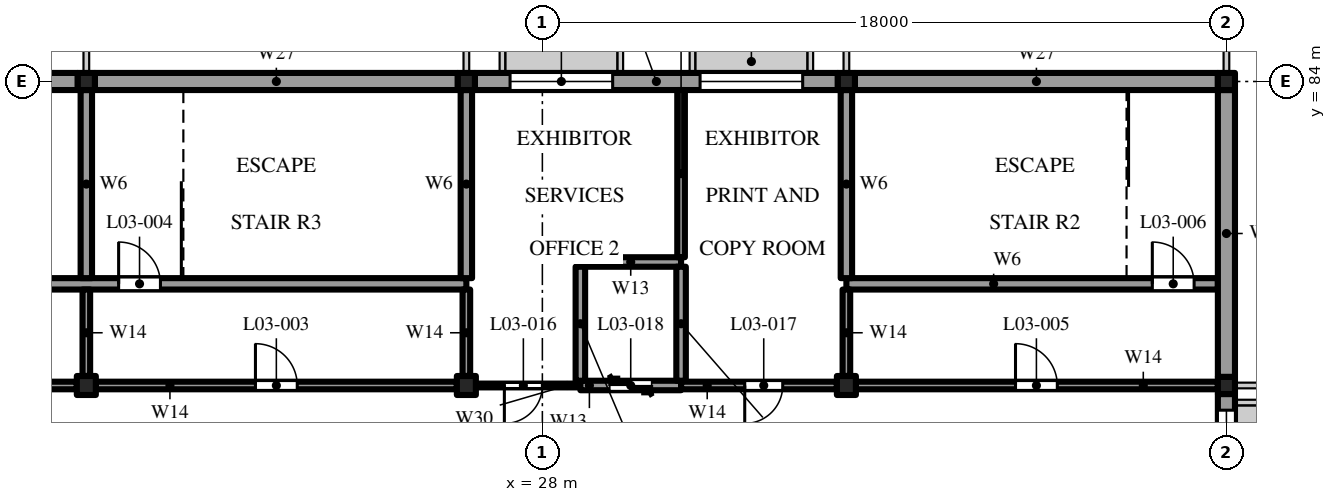
"""IFC4 building model, lengths in metres.
Left out: names, types, materials, properties, quantities, classifications, styles, units other than length and angle.
Written with IfcOpenShell. Run it as: python <this file> out.ifc"""

import sys

from ifc_helpers import new_model, si_unit, direction, frame, frame_2d, origin, origin_2d, place, context, subcontext, project, spatial, polyline, rectangle, outline, extrude, element, fill, save


model = new_model("IFC4")
c1 = context("Model", 3, precision=1e-05, world=origin(), true_north=direction((0.0, 1.0)))
c2 = subcontext(c1, "Body", "Model", "MODEL_VIEW")
j1 = project(units=[si_unit("LENGTHUNIT", "METRE"), si_unit("PLANEANGLEUNIT", "RADIAN")], contexts=[c1])
p1 = place(None, origin())
s1 = spatial("IfcSite", under=j1, at=p1, CompositionType="ELEMENT")
p2 = place(p1, origin())
s2 = spatial("IfcBuilding", under=s1, at=p2, CompositionType="ELEMENT")
p3 = place(p2, frame((0.0, 0.0, 16.8)))
s3 = spatial("IfcBuildingStorey", under=s2, at=p3, CompositionType="ELEMENT", Elevation=16.8)
p4 = place(p3, frame((16.0, 76.0, 0.0), z_axis=(0.0, 0.0, 1.0), x_axis=(1.0, 0.0, 0.0)))
e1 = element("IfcColumn", 1, at=p4, inside=s3, PredefinedType="COLUMN", context=c2, shape_type="SweptSolid", body=[
    extrude(rectangle(XDim=0.5, YDim=0.5, at=origin_2d()), origin(), (0.0, 0.0, 1.0), 4.8),
])
p5 = place(p3, frame((16.0, 84.0, 0.0), z_axis=(0.0, 0.0, 1.0), x_axis=(1.0, 0.0, 0.0)))
e2 = element("IfcColumn", 2, at=p5, inside=s3, PredefinedType="COLUMN", context=c2, shape_type="SweptSolid", body=[
    extrude(rectangle(XDim=0.45, YDim=0.45, at=origin_2d()), origin(), (0.0, 0.0, 1.0), 4.8),
])
p6 = place(p3, frame((26.0, 76.0, 0.0), z_axis=(0.0, 0.0, 1.0), x_axis=(1.0, 0.0, 0.0)))
e3 = element("IfcColumn", 3, at=p6, inside=s3, PredefinedType="COLUMN", context=c2, shape_type="SweptSolid", body=[
    extrude(rectangle(XDim=0.5, YDim=0.5, at=origin_2d()), origin(), (0.0, 0.0, 1.0), 4.8),
])
p7 = place(p3, frame((26.0, 84.0, 0.0), z_axis=(0.0, 0.0, 1.0), x_axis=(1.0, 0.0, 0.0)))
e4 = element("IfcColumn", 4, at=p7, inside=s3, PredefinedType="COLUMN", context=c2, shape_type="SweptSolid", body=[
    extrude(rectangle(XDim=0.45, YDim=0.45, at=origin_2d()), origin(), (0.0, 0.0, 1.0), 4.8),
])
p8 = place(p3, frame((36.0, 76.0, 0.0), z_axis=(0.0, 0.0, 1.0), x_axis=(1.0, 0.0, 0.0)))
e5 = element("IfcColumn", 5, at=p8, inside=s3, PredefinedType="COLUMN", context=c2, shape_type="SweptSolid", body=[
    extrude(rectangle(XDim=0.5, YDim=0.5, at=origin_2d()), origin(), (0.0, 0.0, 1.0), 4.8),
])
for number, where, z_axis, x_axis in (
    (6, (36.0, 84.0, 0.0), (0.0, 0.0, 1.0), (1.0, 0.0, 0.0)),
    (7, (46.0, 76.0, 0.0), (0.0, 0.0, 1.0), (1.0, 0.0, 0.0)),
    (8, (46.0, 84.0, 0.0), (0.0, 0.0, 1.0), (1.0, 0.0, 0.0)),
):
    element("IfcColumn", number, at=place(p3, frame(where, z_axis=z_axis, x_axis=x_axis)), inside=s3, PredefinedType="COLUMN", context=c2, shape_type="SweptSolid", body=[
        extrude(rectangle(XDim=0.45, YDim=0.45, at=origin_2d()), origin(), (0.0, 0.0, 1.0), 4.8),
    ])
p9 = place(p3, frame((6.225, 76.0, 0.0), z_axis=(0.0, 0.0, 1.0), x_axis=(1.0, 0.0, 0.0)))
e9 = element("IfcWall", 9, at=p9, inside=s3, PredefinedType="SOLIDWALL", context=c2, shape_type="SweptSolid", body=[
    extrude(rectangle(XDim=9.525, YDim=0.2, at=frame_2d((4.762, 0.0))), origin(), (0.0, 0.0, 1.0), 10.343),
])
p10 = place(p9, frame((7.325, 0.0, 0.0)))
e10 = element("IfcOpeningElement", 10, at=p10, cuts=e9, PredefinedType="OPENING", context=c2, shape_type="SweptSolid", body=[
    extrude(rectangle(XDim=1.1, YDim=2.1, at=frame_2d((0.55, 1.05))), frame((0.0, 0.11, 0.0), z_axis=(0.0, -1.0, 0.0), x_axis=(1.0, 0.0, 0.0)), (0.0, 0.0, 1.0), 0.22),
])
p11 = place(p3, frame((16.25, 76.0, 0.0), z_axis=(0.0, 0.0, 1.0), x_axis=(1.0, 0.0, 0.0)))
e11 = element("IfcWall", 11, at=p11, inside=s3, PredefinedType="SOLIDWALL", context=c2, shape_type="SweptSolid", body=[
    extrude(rectangle(XDim=9.5, YDim=0.2, at=frame_2d((4.75, 0.0))), origin(), (0.0, 0.0, 1.0), 10.343),
])
p12 = place(p11, frame((4.2, 0.0, 0.0)))
e12 = element("IfcOpeningElement", 12, at=p12, cuts=e11, PredefinedType="OPENING", context=c2, shape_type="SweptSolid", body=[
    extrude(rectangle(XDim=1.1, YDim=2.1, at=frame_2d((0.55, 1.05))), frame((0.0, 0.11, 0.0), z_axis=(0.0, -1.0, 0.0), x_axis=(1.0, 0.0, 0.0)), (0.0, 0.0, 1.0), 0.22),
])
p13 = place(p3, frame((26.25, 76.0, 0.0), z_axis=(0.0, 0.0, 1.0), x_axis=(1.0, 0.0, 0.0)))
e13 = element("IfcWall", 13, at=p13, inside=s3, PredefinedType="PARTITIONING", context=c2, shape_type="SweptSolid", body=[
    extrude(rectangle(XDim=2.75, YDim=0.1, at=frame_2d((1.375, 0.0))), origin(), (0.0, 0.0, 1.0), 10.343),
])
p14 = place(p13, frame((0.75, 0.0, 0.0)))
e14 = element("IfcOpeningElement", 14, at=p14, cuts=e13, PredefinedType="OPENING", context=c2, shape_type="SweptSolid", body=[
    extrude(rectangle(XDim=1.0, YDim=2.1, at=frame_2d((0.5, 1.05))), frame((0.0, 0.06, 0.0), z_axis=(0.0, -1.0, 0.0), x_axis=(1.0, 0.0, 0.0)), (0.0, 0.0, 1.0), 0.12),
])
p15 = place(p3, frame((29.0, 76.0, 0.0), z_axis=(0.0, 0.0, 1.0), x_axis=(1.0, 0.0, 0.0)))
e15 = element("IfcWall", 15, at=p15, inside=s3, PredefinedType="SOLIDWALL", context=c2, shape_type="SweptSolid", body=[
    extrude(rectangle(XDim=2.65, YDim=0.25, at=frame_2d((1.325, 0.0))), origin(), (0.0, 0.0, 1.0), 10.343),
])
p16 = place(p15, frame((0.775, 0.0, 0.0)))
e16 = element("IfcOpeningElement", 16, at=p16, cuts=e15, PredefinedType="OPENING", context=c2, shape_type="SweptSolid", body=[
    extrude(rectangle(XDim=1.1, YDim=2.1, at=frame_2d((0.55, 1.05))), frame((0.0, 0.135, 0.0), z_axis=(0.0, -1.0, 0.0), x_axis=(1.0, 0.0, 0.0)), (0.0, 0.0, 1.0), 0.27),
])
p17 = place(p3, frame((31.65, 76.0, 0.0), z_axis=(0.0, 0.0, 1.0), x_axis=(1.0, 0.0, 0.0)))
e17 = element("IfcWall", 17, at=p17, inside=s3, PredefinedType="SOLIDWALL", context=c2, shape_type="SweptSolid", body=[
    extrude(rectangle(XDim=4.1, YDim=0.2, at=frame_2d((2.05, 0.0))), origin(), (0.0, 0.0, 1.0), 10.343),
])
p18 = place(p17, frame((1.675, 0.0, 0.0)))
e18 = element("IfcOpeningElement", 18, at=p18, cuts=e17, PredefinedType="OPENING", context=c2, shape_type="SweptSolid", body=[
    extrude(rectangle(XDim=1.0, YDim=2.1, at=frame_2d((0.5, 1.05))), frame((0.0, 0.11, 0.0), z_axis=(0.0, -1.0, 0.0), x_axis=(1.0, 0.0, 0.0)), (0.0, 0.0, 1.0), 0.22),
])
p19 = place(p3, frame((36.25, 76.0, 0.0), z_axis=(0.0, 0.0, 1.0), x_axis=(1.0, 0.0, 0.0)))
e19 = element("IfcWall", 19, at=p19, inside=s3, PredefinedType="SOLIDWALL", context=c2, shape_type="SweptSolid", body=[
    extrude(rectangle(XDim=9.525, YDim=0.2, at=frame_2d((4.762, 0.0))), origin(), (0.0, 0.0, 1.0), 10.343),
])
p20 = place(p19, frame((4.2, 0.0, 0.0)))
e20 = element("IfcOpeningElement", 20, at=p20, cuts=e19, PredefinedType="OPENING", context=c2, shape_type="SweptSolid", body=[
    extrude(rectangle(XDim=1.1, YDim=2.1, at=frame_2d((0.55, 1.05))), frame((0.0, 0.11, 0.0), z_axis=(0.0, -1.0, 0.0), x_axis=(1.0, 0.0, 0.0)), (0.0, 0.0, 1.0), 0.22),
])
p21 = place(p3, frame((6.225, 78.675, 0.0), z_axis=(0.0, 0.0, 1.0), x_axis=(1.0, 0.0, 0.0)))
e21 = element("IfcWall", 21, at=p21, inside=s3, PredefinedType="SHEAR", context=c2, shape_type="SweptSolid", body=[
    extrude(rectangle(XDim=19.775, YDim=0.3, at=frame_2d((9.887, 0.0))), origin(), (0.0, 0.0, 1.0), 10.911),
])
p22 = place(p21, frame((0.625, 0.0, 0.0)))
e22 = element("IfcOpeningElement", 22, at=p22, cuts=e21, PredefinedType="OPENING", context=c2, shape_type="SweptSolid", body=[
    extrude(rectangle(XDim=1.1, YDim=2.1, at=frame_2d((0.55, 1.05))), frame((0.0, 0.16, 0.0), z_axis=(0.0, -1.0, 0.0), x_axis=(1.0, 0.0, 0.0)), (0.0, 0.0, 1.0), 0.32),
])
p23 = place(p21, frame((10.625, 0.0, 0.0)))
e23 = element("IfcOpeningElement", 23, at=p23, cuts=e21, PredefinedType="OPENING", context=c2, shape_type="SweptSolid", body=[
    extrude(rectangle(XDim=1.1, YDim=2.1, at=frame_2d((0.55, 1.05))), frame((0.0, 0.16, 0.0), z_axis=(0.0, -1.0, 0.0), x_axis=(1.0, 0.0, 0.0)), (0.0, 0.0, 1.0), 0.32),
])
p24 = place(p3, frame((36.0, 78.675, 0.0), z_axis=(0.0, 0.0, 1.0), x_axis=(1.0, 0.0, 0.0)))
e24 = element("IfcWall", 24, at=p24, inside=s3, PredefinedType="SHEAR", context=c2, shape_type="SweptSolid", body=[
    extrude(rectangle(XDim=9.775, YDim=0.3, at=frame_2d((4.887, 0.0))), origin(), (0.0, 0.0, 1.0), 10.911),
])
p25 = place(p24, frame((8.05, 0.0, 0.0)))
e25 = element("IfcOpeningElement", 25, at=p25, cuts=e24, PredefinedType="OPENING", context=c2, shape_type="SweptSolid", body=[
    extrude(rectangle(XDim=1.1, YDim=2.1, at=frame_2d((0.55, 1.05))), frame((0.0, 0.16, 0.0), z_axis=(0.0, -1.0, 0.0), x_axis=(1.0, 0.0, 0.0)), (0.0, 0.0, 1.0), 0.32),
])
p26 = place(p3, frame((29.0, 79.25, 0.0), z_axis=(0.0, 0.0, 1.0), x_axis=(1.0, 0.0, 0.0)))
e26 = element("IfcWall", 26, at=p26, inside=s3, PredefinedType="SOLIDWALL", context=c2, shape_type="SweptSolid", body=[
    extrude(rectangle(XDim=2.65, YDim=0.25, at=frame_2d((1.325, 0.0))), origin(), (0.0, 0.0, 1.0), 11.034),
])
for number, where, z_axis, x_axis in (
    (27, (15.775, 84.0, 0.0), (0.0, 0.0, 1.0), (-1.0, 0.0, 0.0)),
    (28, (25.775, 84.0, 0.0), (0.0, 0.0, 1.0), (-1.0, 0.0, 0.0)),
):
    element("IfcWall", number, at=place(p3, frame(where, z_axis=z_axis, x_axis=x_axis)), inside=s3, PredefinedType="SOLIDWALL", context=c2, shape_type="SweptSolid", body=[
        extrude(rectangle(XDim=9.55, YDim=0.45, at=frame_2d((4.775, 0.0))), origin(), (0.0, 0.0, 1.0), 12.043),
    ])
p27 = place(p3, frame((35.775, 84.0, 0.0), z_axis=(0.0, 0.0, 1.0), x_axis=(-1.0, 0.0, 0.0)))
e29 = element("IfcWall", 29, at=p27, inside=s3, PredefinedType="SOLIDWALL", context=c2, shape_type="SweptSolid", body=[
    extrude(rectangle(XDim=9.55, YDim=0.45, at=frame_2d((4.775, 0.0))), origin(), (0.0, 0.0, 1.0), 12.043),
])
p28 = place(p27, frame((5.925, 0.0, 0.8)))
e30 = element("IfcOpeningElement", 30, at=p28, cuts=e29, PredefinedType="OPENING", context=c2, shape_type="SweptSolid", body=[
    extrude(rectangle(XDim=2.7, YDim=2.4, at=frame_2d((1.35, 1.2))), frame((0.0, 0.235, 0.0), z_axis=(0.0, -1.0, 0.0), x_axis=(1.0, 0.0, 0.0)), (0.0, 0.0, 1.0), 0.47),
])
p29 = place(p27, frame((0.925, 0.0, 0.8)))
e31 = element("IfcOpeningElement", 31, at=p29, cuts=e29, PredefinedType="OPENING", context=c2, shape_type="SweptSolid", body=[
    extrude(rectangle(XDim=2.7, YDim=2.4, at=frame_2d((1.35, 1.2))), frame((0.0, 0.235, 0.0), z_axis=(0.0, -1.0, 0.0), x_axis=(1.0, 0.0, 0.0)), (0.0, 0.0, 1.0), 0.47),
])
p30 = place(p3, frame((45.775, 84.0, 0.0), z_axis=(0.0, 0.0, 1.0), x_axis=(-1.0, 0.0, 0.0)))
e32 = element("IfcWall", 32, at=p30, inside=s3, PredefinedType="SOLIDWALL", context=c2, shape_type="SweptSolid", body=[
    extrude(rectangle(XDim=9.55, YDim=0.45, at=frame_2d((4.775, 0.0))), origin(), (0.0, 0.0, 1.0), 12.043),
])
p31 = place(p3, frame((16.0, 76.25, 0.0), z_axis=(0.0, 0.0, 1.0), x_axis=(0.0, 1.0, 0.0)))
e33 = element("IfcWall", 33, at=p31, inside=s3, PredefinedType="SOLIDWALL", context=c2, shape_type="SweptSolid", body=[
    extrude(outline(polyline([(0.0, 0.0), (2.275, 0.0), (2.275, 10.88), (0.0, 10.396), (0.0, 0.0)])), frame((0.0, 0.1, 0.0), z_axis=(0.0, -1.0, 0.0), x_axis=(1.0, 0.0, 0.0)), (0.0, 0.0, 1.0), 0.2),
])
p32 = place(p3, frame((16.0, 78.825, 0.0), z_axis=(0.0, 0.0, 1.0), x_axis=(0.0, 1.0, 0.0)))
e34 = element("IfcWall", 34, at=p32, inside=s3, PredefinedType="SHEAR", context=c2, shape_type="SweptSolid", body=[
    extrude(outline(polyline([(0.0, 0.0), (4.95, 0.0), (4.95, 11.996), (0.0, 10.943), (0.0, 0.0)])), frame((0.0, 0.15, 0.0), z_axis=(0.0, -1.0, 0.0), x_axis=(1.0, 0.0, 0.0)), (0.0, 0.0, 1.0), 0.3),
])
p33 = place(p3, frame((26.0, 76.25, 0.0), z_axis=(0.0, 0.0, 1.0), x_axis=(0.0, 1.0, 0.0)))
e35 = element("IfcWall", 35, at=p33, inside=s3, PredefinedType="SOLIDWALL", context=c2, shape_type="SweptSolid", body=[
    extrude(outline(polyline([(0.0, 0.0), (2.275, 0.0), (2.275, 10.88), (0.0, 10.396), (0.0, 0.0)])), frame((0.0, 0.1, 0.0), z_axis=(0.0, -1.0, 0.0), x_axis=(1.0, 0.0, 0.0)), (0.0, 0.0, 1.0), 0.2),
])
p34 = place(p3, frame((26.0, 78.825, 0.0), z_axis=(0.0, 0.0, 1.0), x_axis=(0.0, 1.0, 0.0)))
e36 = element("IfcWall", 36, at=p34, inside=s3, PredefinedType="SHEAR", context=c2, shape_type="SweptSolid", body=[
    extrude(outline(polyline([(0.0, 0.0), (4.95, 0.0), (4.95, 11.996), (0.0, 10.943), (0.0, 0.0)])), frame((0.0, 0.15, 0.0), z_axis=(0.0, -1.0, 0.0), x_axis=(1.0, 0.0, 0.0)), (0.0, 0.0, 1.0), 0.3),
])
for number, where, z_axis, x_axis in (
    (37, (29.0, 76.125, 0.0), (0.0, 0.0, 1.0), (0.0, 1.0, 0.0)),
    (38, (31.65, 76.125, 0.0), (0.0, 0.0, 1.0), (0.0, 1.0, 0.0)),
):
    element("IfcWall", number, at=place(p3, frame(where, z_axis=z_axis, x_axis=x_axis)), inside=s3, PredefinedType="SOLIDWALL", context=c2, shape_type="SweptSolid", body=[
        extrude(outline(polyline([(0.0, 0.0), (3.0, 0.0), (3.0, 11.007), (0.0, 10.369), (0.0, 0.0)])), frame((0.0, 0.125, 0.0), z_axis=(0.0, -1.0, 0.0), x_axis=(1.0, 0.0, 0.0)), (0.0, 0.0, 1.0), 0.25),
    ])
p35 = place(p3, frame((31.65, 79.375, 0.0), z_axis=(0.0, 0.0, 1.0), x_axis=(0.0, 1.0, 0.0)))
e39 = element("IfcWall", 39, at=p35, inside=s3, PredefinedType="SOLIDWALL", context=c2, shape_type="SweptSolid", body=[
    extrude(outline(polyline([(0.0, 0.0), (4.4, 0.0), (4.4, 11.996), (0.0, 11.06), (0.0, 0.0)])), frame((0.0, 0.1, 0.0), z_axis=(0.0, -1.0, 0.0), x_axis=(1.0, 0.0, 0.0)), (0.0, 0.0, 1.0), 0.2),
])
p36 = place(p3, frame((36.0, 76.25, 0.0), z_axis=(0.0, 0.0, 1.0), x_axis=(0.0, 1.0, 0.0)))
e40 = element("IfcWall", 40, at=p36, inside=s3, PredefinedType="SOLIDWALL", context=c2, shape_type="SweptSolid", body=[
    extrude(outline(polyline([(0.0, 0.0), (2.275, 0.0), (2.275, 10.88), (0.0, 10.396), (0.0, 0.0)])), frame((0.0, 0.1, 0.0), z_axis=(0.0, -1.0, 0.0), x_axis=(1.0, 0.0, 0.0)), (0.0, 0.0, 1.0), 0.2),
])
p37 = place(p3, frame((36.0, 78.825, 0.0), z_axis=(0.0, 0.0, 1.0), x_axis=(0.0, 1.0, 0.0)))
e41 = element("IfcWall", 41, at=p37, inside=s3, PredefinedType="SHEAR", context=c2, shape_type="SweptSolid", body=[
    extrude(outline(polyline([(0.0, 0.0), (4.95, 0.0), (4.95, 11.996), (0.0, 10.943), (0.0, 0.0)])), frame((0.0, 0.15, 0.0), z_axis=(0.0, -1.0, 0.0), x_axis=(1.0, 0.0, 0.0)), (0.0, 0.0, 1.0), 0.3),
])
p38 = place(p3, frame((46.0, 68.225, 0.0), z_axis=(0.0, 0.0, 1.0), x_axis=(0.0, 1.0, 0.0)))
e42 = element("IfcWall", 42, at=p38, inside=s3, PredefinedType="SOLIDWALL", context=c2, shape_type="SweptSolid", body=[
    extrude(outline(polyline([(0.0, 0.0), (7.55, 0.0), (7.55, 10.295), (0.0, 8.69), (0.0, 0.0)])), frame((0.0, 0.225, 0.0), z_axis=(0.0, -1.0, 0.0), x_axis=(1.0, 0.0, 0.0)), (0.0, 0.0, 1.0), 0.45),
])
p39 = place(p38, frame((0.425, 0.0, 0.8)))
e43 = element("IfcOpeningElement", 43, at=p39, cuts=e42, PredefinedType="OPENING", context=c2, shape_type="SweptSolid", body=[
    extrude(rectangle(XDim=2.7, YDim=2.4, at=frame_2d((1.35, 1.2))), frame((0.0, 0.235, 0.0), z_axis=(0.0, -1.0, 0.0), x_axis=(1.0, 0.0, 0.0)), (0.0, 0.0, 1.0), 0.47),
])
p40 = place(p38, frame((4.425, 0.0, 0.8)))
e44 = element("IfcOpeningElement", 44, at=p40, cuts=e42, PredefinedType="OPENING", context=c2, shape_type="SweptSolid", body=[
    extrude(rectangle(XDim=2.7, YDim=2.4, at=frame_2d((1.35, 1.2))), frame((0.0, 0.235, 0.0), z_axis=(0.0, -1.0, 0.0), x_axis=(1.0, 0.0, 0.0)), (0.0, 0.0, 1.0), 0.47),
])
p41 = place(p3, frame((46.0, 76.225, 0.0), z_axis=(0.0, 0.0, 1.0), x_axis=(0.0, 1.0, 0.0)))
e45 = element("IfcWall", 45, at=p41, inside=s3, PredefinedType="SOLIDWALL", context=c2, shape_type="SweptSolid", body=[
    extrude(outline(polyline([(0.0, 0.0), (7.55, 0.0), (7.55, 11.996), (0.0, 10.391), (0.0, 0.0)])), frame((0.0, 0.225, 0.0), z_axis=(0.0, -1.0, 0.0), x_axis=(1.0, 0.0, 0.0)), (0.0, 0.0, 1.0), 0.45),
])
p42 = place(p12, origin())
e46 = element("IfcDoor", 46, at=p42, inside=s3, OperationType="SINGLE_SWING_LEFT", PredefinedType="DOOR", context=c2, shape_type="SweptSolid", body=[
    extrude(rectangle(XDim=1.1, YDim=2.1, at=frame_2d((0.55, 1.05))), frame((0.0, 0.025, 0.0), z_axis=(0.0, -1.0, 0.0), x_axis=(1.0, 0.0, 0.0)), (0.0, 0.0, 1.0), 0.05),
])
fill(e12, e46)
p43 = place(p23, origin())
e47 = element("IfcDoor", 47, at=p43, inside=s3, OperationType="SINGLE_SWING_RIGHT", PredefinedType="DOOR", context=c2, shape_type="SweptSolid", body=[
    extrude(rectangle(XDim=1.1, YDim=2.1, at=frame_2d((0.55, 1.05))), frame((0.0, 0.025, 0.0), z_axis=(0.0, -1.0, 0.0), x_axis=(1.0, 0.0, 0.0)), (0.0, 0.0, 1.0), 0.05),
])
fill(e23, e47)
p44 = place(p20, origin())
e48 = element("IfcDoor", 48, at=p44, inside=s3, OperationType="SINGLE_SWING_LEFT", PredefinedType="DOOR", context=c2, shape_type="SweptSolid", body=[
    extrude(rectangle(XDim=1.1, YDim=2.1, at=frame_2d((0.55, 1.05))), frame((0.0, 0.025, 0.0), z_axis=(0.0, -1.0, 0.0), x_axis=(1.0, 0.0, 0.0)), (0.0, 0.0, 1.0), 0.05),
])
fill(e20, e48)
p45 = place(p25, origin())
e49 = element("IfcDoor", 49, at=p45, inside=s3, OperationType="SINGLE_SWING_RIGHT", PredefinedType="DOOR", context=c2, shape_type="SweptSolid", body=[
    extrude(rectangle(XDim=1.1, YDim=2.1, at=frame_2d((0.55, 1.05))), frame((0.0, 0.025, 0.0), z_axis=(0.0, -1.0, 0.0), x_axis=(1.0, 0.0, 0.0)), (0.0, 0.0, 1.0), 0.05),
])
fill(e25, e49)
p46 = place(p14, frame((1.0, 0.0, 0.0), z_axis=(0.0, 0.0, 1.0), x_axis=(-1.0, 0.0, 0.0)))
e50 = element("IfcDoor", 50, at=p46, inside=s3, OperationType="SINGLE_SWING_LEFT", PredefinedType="DOOR", context=c2, shape_type="SweptSolid", body=[
    extrude(rectangle(XDim=1.0, YDim=2.1, at=frame_2d((0.5, 1.05))), frame((0.0, 0.025, 0.0), z_axis=(0.0, -1.0, 0.0), x_axis=(1.0, 0.0, 0.0)), (0.0, 0.0, 1.0), 0.05),
])
fill(e14, e50)
p47 = place(p18, frame((1.0, 0.0, 0.0), z_axis=(0.0, 0.0, 1.0), x_axis=(-1.0, 0.0, 0.0)))
e51 = element("IfcDoor", 51, at=p47, inside=s3, OperationType="SINGLE_SWING_RIGHT", PredefinedType="DOOR", context=c2, shape_type="SweptSolid", body=[
    extrude(rectangle(XDim=1.0, YDim=2.1, at=frame_2d((0.5, 1.05))), frame((0.0, 0.025, 0.0), z_axis=(0.0, -1.0, 0.0), x_axis=(1.0, 0.0, 0.0)), (0.0, 0.0, 1.0), 0.05),
])
fill(e18, e51)
p48 = place(p16, frame((1.1, 0.0, 0.0), z_axis=(0.0, 0.0, 1.0), x_axis=(-1.0, 0.0, 0.0)))
e52 = element("IfcDoor", 52, at=p48, inside=s3, OperationType="DOUBLE_DOOR_SLIDING", PredefinedType="DOOR", context=c2, shape_type="SweptSolid", body=[
    extrude(rectangle(XDim=1.1, YDim=2.1, at=frame_2d((0.55, 1.05))), frame((0.0, 0.025, 0.0), z_axis=(0.0, -1.0, 0.0), x_axis=(1.0, 0.0, 0.0)), (0.0, 0.0, 1.0), 0.05),
])
fill(e16, e52)
p49 = place(p28, origin())
e53 = element("IfcWindow", 53, at=p49, inside=s3, PartitioningType="SINGLE_PANEL", PredefinedType="WINDOW", context=c2, shape_type="SweptSolid", body=[
    extrude(rectangle(XDim=2.7, YDim=2.4, at=frame_2d((1.35, 1.2))), frame((0.0, 0.215, 0.0), z_axis=(0.0, -1.0, 0.0), x_axis=(1.0, 0.0, 0.0)), (0.0, 0.0, 1.0), 0.06),
])
fill(e30, e53)
p50 = place(p29, origin())
e54 = element("IfcWindow", 54, at=p50, inside=s3, PartitioningType="SINGLE_PANEL", PredefinedType="WINDOW", context=c2, shape_type="SweptSolid", body=[
    extrude(rectangle(XDim=2.7, YDim=2.4, at=frame_2d((1.35, 1.2))), frame((0.0, 0.215, 0.0), z_axis=(0.0, -1.0, 0.0), x_axis=(1.0, 0.0, 0.0)), (0.0, 0.0, 1.0), 0.06),
])
fill(e31, e54)
p51 = place(p40, origin())
e55 = element("IfcWindow", 55, at=p51, inside=s3, PartitioningType="SINGLE_PANEL", PredefinedType="WINDOW", context=c2, shape_type="SweptSolid", body=[
    extrude(rectangle(XDim=2.7, YDim=2.4, at=frame_2d((1.35, 1.2))), frame((0.0, 0.215, 0.0), z_axis=(0.0, -1.0, 0.0), x_axis=(1.0, 0.0, 0.0)), (0.0, 0.0, 1.0), 0.06),
])
fill(e44, e55)
save(model, sys.argv[1])
